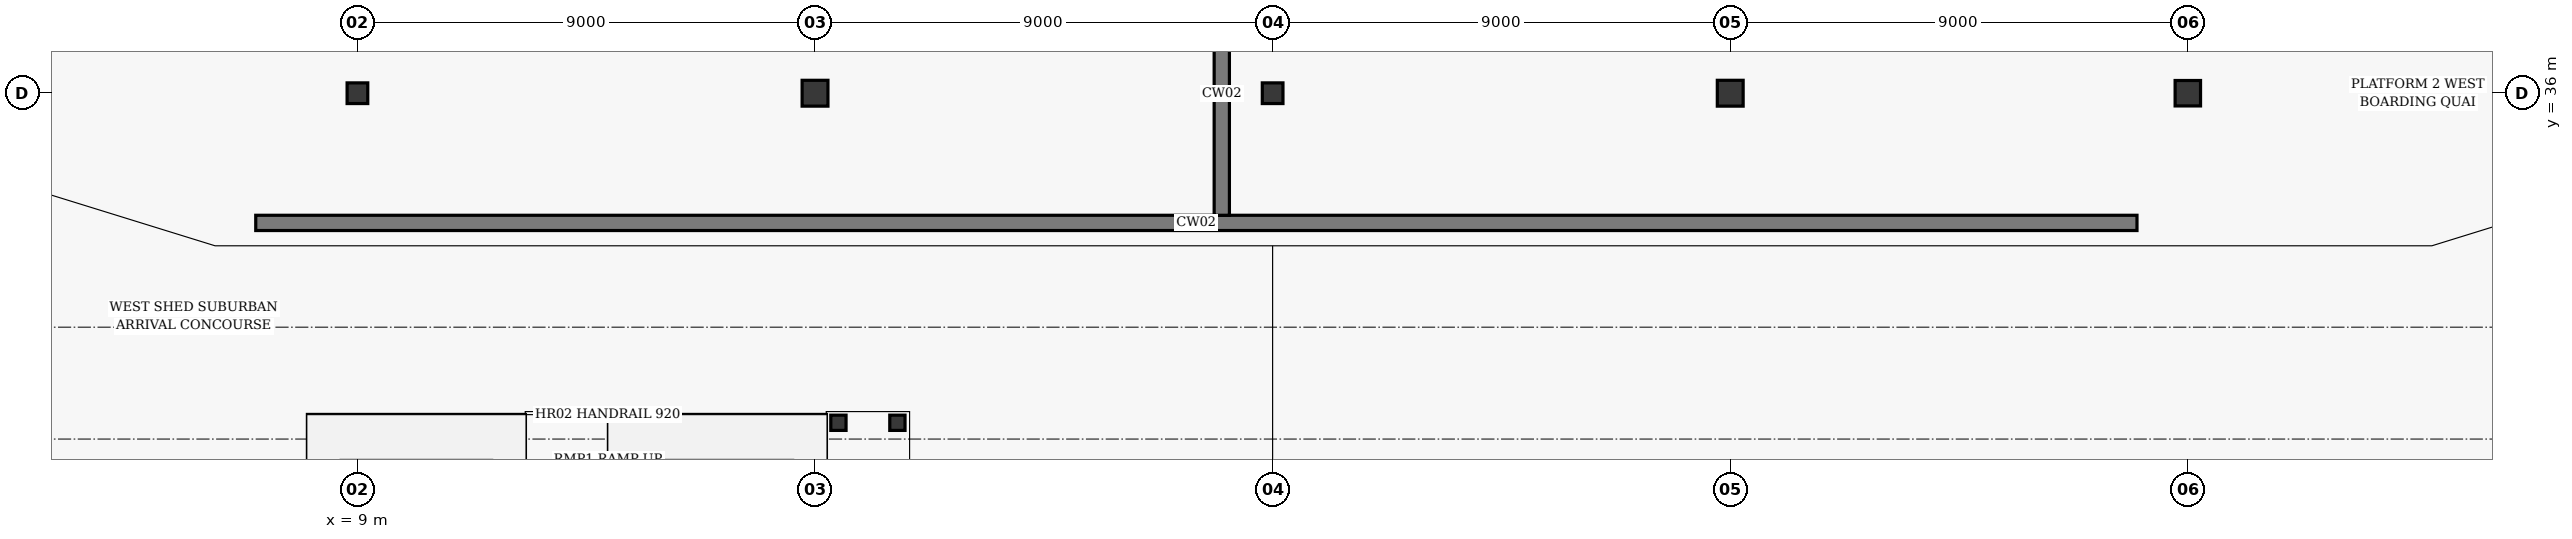
"""IFC4 building model, lengths in metres.
Left out: names, types, materials, properties, quantities, classifications, styles, units other than length and angle.
Written with IfcOpenShell. Run it as: python <this file> out.ifc"""

import sys

from ifc_helpers import new_model, si_unit, direction, frame, frame_2d, origin, origin_2d, place, context, subcontext, project, spatial, rectangle, hollow_rectangle, hollow_circle, i_section, extrude, element, save


model = new_model("IFC4")
c1 = context("Model", 3, precision=1e-05, world=origin(), true_north=direction((0.0, 1.0)))
c2 = subcontext(c1, "Body", "Model", "MODEL_VIEW")
j1 = project(units=[si_unit("LENGTHUNIT", "METRE"), si_unit("PLANEANGLEUNIT", "RADIAN")], contexts=[c1])
p1 = place(None, origin())
s1 = spatial("IfcSite", under=j1, at=p1, CompositionType="ELEMENT")
p2 = place(p1, origin())
s2 = spatial("IfcBuilding", under=s1, at=p2, CompositionType="ELEMENT")
p3 = place(p2, origin())
s3 = spatial("IfcBuildingStorey", under=s2, at=p3, CompositionType="ELEMENT", Elevation=0.0)
p4 = place(p3, frame((9.0, 36.0, 0.0), z_axis=(0.0, 0.0, 1.0), x_axis=(1.0, 0.0, 0.0)))
e1 = element("IfcColumn", 1, at=p4, inside=s3, PredefinedType="COLUMN", context=c2, shape_type="SweptSolid", body=[
    extrude(hollow_circle(Radius=0.203, WallThickness=0.014, at=origin_2d()), origin(), (0.0, 0.0, 1.0), 6.6),
])
p5 = place(p3, frame((18.0, 36.0, 0.0), z_axis=(0.0, 0.0, 1.0), x_axis=(1.0, 0.0, 0.0)))
e2 = element("IfcColumn", 2, at=p5, inside=s3, PredefinedType="COLUMN", context=c2, shape_type="SweptSolid", body=[
    extrude(hollow_circle(Radius=0.254, WallThickness=0.016, at=origin_2d()), origin(), (0.0, 0.0, 1.0), 6.6),
])
p6 = place(p3, frame((27.0, 36.0, 0.0), z_axis=(0.0, 0.0, 1.0), x_axis=(1.0, 0.0, 0.0)))
e3 = element("IfcColumn", 3, at=p6, inside=s3, PredefinedType="COLUMN", context=c2, shape_type="SweptSolid", body=[
    extrude(hollow_circle(Radius=0.203, WallThickness=0.014, at=origin_2d()), origin(), (0.0, 0.0, 1.0), 6.6),
])
p7 = place(p3, frame((36.0, 36.0, 0.0), z_axis=(0.0, 0.0, 1.0), x_axis=(1.0, 0.0, 0.0)))
e4 = element("IfcColumn", 4, at=p7, inside=s3, PredefinedType="COLUMN", context=c2, shape_type="SweptSolid", body=[
    extrude(hollow_circle(Radius=0.254, WallThickness=0.016, at=origin_2d()), origin(), (0.0, 0.0, 1.0), 6.6),
])
p8 = place(p3, frame((45.0, 36.0, 0.0), z_axis=(0.0, 0.0, 1.0), x_axis=(1.0, 0.0, 0.0)))
e5 = element("IfcColumn", 5, at=p8, inside=s3, PredefinedType="COLUMN", context=c2, shape_type="SweptSolid", body=[
    extrude(hollow_rectangle(XDim=0.5, YDim=0.5, WallThickness=0.02, at=origin_2d()), origin(), (0.0, 0.0, 1.0), 6.6),
])
p9 = place(p3, frame((7.0, 33.45, 0.0), z_axis=(0.0, 0.0, 1.0), x_axis=(1.0, 0.0, 0.0)))
e6 = element("IfcWall", 6, at=p9, inside=s3, PredefinedType="SOLIDWALL", context=c2, shape_type="SweptSolid", body=[
    extrude(rectangle(XDim=37.0, YDim=0.3, at=frame_2d((18.5, 0.0))), origin(), (0.0, 0.0, 1.0), 0.375),
])
p10 = place(p3, frame((26.0, 33.6, 0.0), z_axis=(0.0, 0.0, 1.0), x_axis=(0.0, 1.0, 0.0)))
e7 = element("IfcWall", 7, at=p10, inside=s3, PredefinedType="SOLIDWALL", context=c2, shape_type="SweptSolid", body=[
    extrude(rectangle(XDim=4.8, YDim=0.3, at=frame_2d((2.4, 0.0))), origin(), (0.0, 0.0, 1.0), 0.375),
])
for number, where, z_axis, x_axis in (
    (8, (18.46, 29.52, 0.0), (0.0, 0.0, 1.0), (1.0, 0.0, 0.0)),
    (9, (19.62, 29.52, 0.0), (0.0, 0.0, 1.0), (1.0, 0.0, 0.0)),
):
    element("IfcColumn", number, at=place(p3, frame(where, z_axis=z_axis, x_axis=x_axis)), inside=s3, PredefinedType="COLUMN", context=c2, shape_type="SweptSolid", body=[
        extrude(i_section(OverallWidth=0.3, OverallDepth=0.3, WebThickness=0.011, FlangeThickness=0.019, at=origin_2d()), origin(), (0.0, 0.0, 1.0), 0.56),
    ])
save(model, sys.argv[1])
